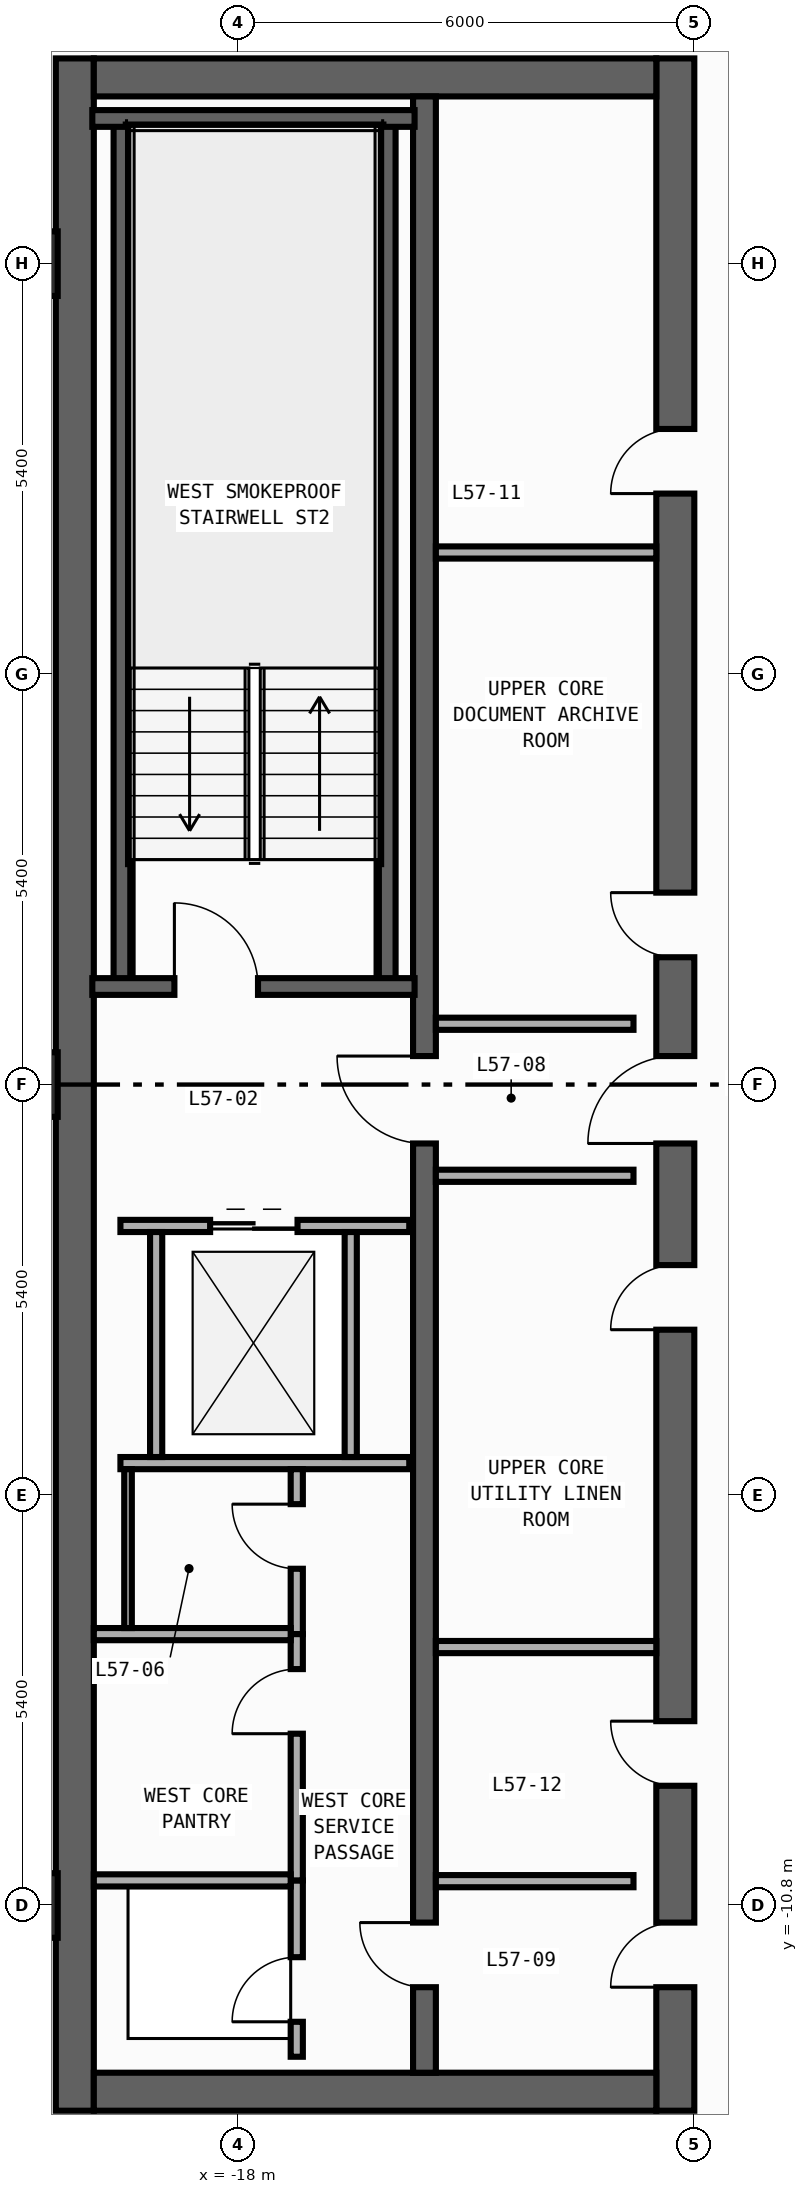
"""IFC4 building model, lengths in metres.
Left out: names, types, materials, properties, quantities, classifications, styles, units other than length and angle.
Written with IfcOpenShell. Run it as: python <this file> out.ifc"""

import sys

from ifc_helpers import new_model, si_unit, direction, frame, frame_2d, origin, origin_2d, place, context, subcontext, project, spatial, rectangle, extrude, element, fill, save


model = new_model("IFC4")
c1 = context("Model", 3, precision=1e-05, world=origin(), true_north=direction((0.0, 1.0)))
c2 = subcontext(c1, "Body", "Model", "MODEL_VIEW")
j1 = project(units=[si_unit("LENGTHUNIT", "METRE"), si_unit("PLANEANGLEUNIT", "RADIAN")], contexts=[c1])
p1 = place(None, origin())
s1 = spatial("IfcSite", under=j1, at=p1, CompositionType="ELEMENT")
p2 = place(p1, origin())
s2 = spatial("IfcBuilding", under=s1, at=p2, CompositionType="ELEMENT")
p3 = place(p2, frame((0.0, 0.0, 244.0)))
s3 = spatial("IfcBuildingStorey", under=s2, at=p3, CompositionType="ELEMENT", Elevation=244.0)
p4 = place(p3, frame((-20.15, -13.5, 0.0), z_axis=(0.0, 0.0, 1.0), x_axis=(0.0, 1.0, 0.0)))
e1 = element("IfcWall", 1, at=p4, inside=s3, PredefinedType="SHEAR", context=c2, shape_type="SweptSolid", body=[
    extrude(rectangle(XDim=27.0, YDim=0.5, at=frame_2d((13.5, 0.0))), origin(), (0.0, 0.0, 1.0), 3.34),
])
p5 = place(p3, frame((-12.25, -13.5, 0.0), z_axis=(0.0, 0.0, 1.0), x_axis=(0.0, 1.0, 0.0)))
e2 = element("IfcWall", 2, at=p5, inside=s3, PredefinedType="SHEAR", context=c2, shape_type="SweptSolid", body=[
    extrude(rectangle(XDim=27.0, YDim=0.5, at=frame_2d((13.5, 0.0))), origin(), (0.0, 0.0, 1.0), 3.34),
])
p6 = place(p5, frame((15.175, 0.0, 0.0)))
e3 = element("IfcOpeningElement", 3, at=p6, cuts=e2, PredefinedType="OPENING", context=c2, shape_type="SweptSolid", body=[
    extrude(rectangle(XDim=0.85, YDim=2.1, at=frame_2d((0.425, 1.05))), frame((0.0, 0.26, 0.0), z_axis=(0.0, -1.0, 0.0), x_axis=(1.0, 0.0, 0.0)), (0.0, 0.0, 1.0), 0.52),
])
p7 = place(p5, frame((21.275, 0.0, 0.0)))
e4 = element("IfcOpeningElement", 4, at=p7, cuts=e2, PredefinedType="OPENING", context=c2, shape_type="SweptSolid", body=[
    extrude(rectangle(XDim=0.85, YDim=2.1, at=frame_2d((0.425, 1.05))), frame((0.0, 0.26, 0.0), z_axis=(0.0, -1.0, 0.0), x_axis=(1.0, 0.0, 0.0)), (0.0, 0.0, 1.0), 0.52),
])
p8 = place(p5, frame((4.275, 0.0, 0.0)))
e5 = element("IfcOpeningElement", 5, at=p8, cuts=e2, PredefinedType="OPENING", context=c2, shape_type="SweptSolid", body=[
    extrude(rectangle(XDim=0.85, YDim=2.1, at=frame_2d((0.425, 1.05))), frame((0.0, 0.26, 0.0), z_axis=(0.0, -1.0, 0.0), x_axis=(1.0, 0.0, 0.0)), (0.0, 0.0, 1.0), 0.52),
])
p9 = place(p5, frame((10.275, 0.0, 0.0)))
e6 = element("IfcOpeningElement", 6, at=p9, cuts=e2, PredefinedType="OPENING", context=c2, shape_type="SweptSolid", body=[
    extrude(rectangle(XDim=0.85, YDim=2.1, at=frame_2d((0.425, 1.05))), frame((0.0, 0.26, 0.0), z_axis=(0.0, -1.0, 0.0), x_axis=(1.0, 0.0, 0.0)), (0.0, 0.0, 1.0), 0.52),
])
p10 = place(p5, frame((12.725, 0.0, 0.0)))
e7 = element("IfcOpeningElement", 7, at=p10, cuts=e2, PredefinedType="OPENING", context=c2, shape_type="SweptSolid", body=[
    extrude(rectangle(XDim=1.15, YDim=2.2, at=frame_2d((0.575, 1.1))), frame((0.0, 0.26, 0.0), z_axis=(0.0, -1.0, 0.0), x_axis=(1.0, 0.0, 0.0)), (0.0, 0.0, 1.0), 0.52),
])
p11 = place(p5, frame((1.625, 0.0, 0.0)))
e8 = element("IfcOpeningElement", 8, at=p11, cuts=e2, PredefinedType="OPENING", context=c2, shape_type="SweptSolid", body=[
    extrude(rectangle(XDim=0.85, YDim=2.1, at=frame_2d((0.425, 1.05))), frame((0.0, 0.26, 0.0), z_axis=(0.0, -1.0, 0.0), x_axis=(1.0, 0.0, 0.0)), (0.0, 0.0, 1.0), 0.52),
])
for number, where, z_axis, x_axis in (
    (9, (-19.9, -13.25, 0.0), (0.0, 0.0, 1.0), (1.0, 0.0, 0.0)),
    (10, (-19.9, 13.25, 0.0), (0.0, 0.0, 1.0), (1.0, 0.0, 0.0)),
):
    element("IfcWall", number, at=place(p3, frame(where, z_axis=z_axis, x_axis=x_axis)), inside=s3, PredefinedType="SHEAR", context=c2, shape_type="SweptSolid", body=[
        extrude(rectangle(XDim=7.4, YDim=0.5, at=frame_2d((3.7, 0.0))), origin(), (0.0, 0.0, 1.0), 3.34),
    ])
p12 = place(p3, frame((-15.55, -13.0, 0.0), z_axis=(0.0, 0.0, 1.0), x_axis=(0.0, 1.0, 0.0)))
e11 = element("IfcWall", 11, at=p12, inside=s3, PredefinedType="SHEAR", context=c2, shape_type="SweptSolid", body=[
    extrude(rectangle(XDim=26.0, YDim=0.3, at=frame_2d((13.0, 0.0))), origin(), (0.0, 0.0, 1.0), 3.34),
])
p13 = place(p12, frame((12.225, 0.0, 0.0)))
e12 = element("IfcOpeningElement", 12, at=p13, cuts=e11, PredefinedType="OPENING", context=c2, shape_type="SweptSolid", body=[
    extrude(rectangle(XDim=1.15, YDim=2.2, at=frame_2d((0.575, 1.1))), frame((0.0, 0.16, 0.0), z_axis=(0.0, -1.0, 0.0), x_axis=(1.0, 0.0, 0.0)), (0.0, 0.0, 1.0), 0.32),
])
p14 = place(p12, frame((1.125, 0.0, 0.0)))
e13 = element("IfcOpeningElement", 13, at=p14, cuts=e11, PredefinedType="OPENING", context=c2, shape_type="SweptSolid", body=[
    extrude(rectangle(XDim=0.85, YDim=2.1, at=frame_2d((0.425, 1.05))), frame((0.0, 0.16, 0.0), z_axis=(0.0, -1.0, 0.0), x_axis=(1.0, 0.0, 0.0)), (0.0, 0.0, 1.0), 0.32),
])
for number, where, z_axis, x_axis in (
    (14, (-16.04, 1.29, 0.0), (0.0, 0.0, 1.0), (0.0, 1.0, 0.0)),
    (15, (-19.53, 1.29, 0.0), (0.0, 0.0, 1.0), (0.0, 1.0, 0.0)),
):
    element("IfcWall", number, at=place(p3, frame(where, z_axis=z_axis, x_axis=x_axis)), inside=s3, PredefinedType="SHEAR", context=c2, shape_type="SweptSolid", body=[
        extrude(rectangle(XDim=11.42, YDim=0.22, at=frame_2d((5.71, 0.0))), origin(), (0.0, 0.0, 1.0), 3.34),
    ])
p15 = place(p3, frame((-19.92, 12.71, 0.0), z_axis=(0.0, 0.0, 1.0), x_axis=(1.0, 0.0, 0.0)))
e16 = element("IfcWall", 16, at=p15, inside=s3, PredefinedType="SHEAR", context=c2, shape_type="SweptSolid", body=[
    extrude(rectangle(XDim=4.24, YDim=0.22, at=frame_2d((2.12, 0.0))), origin(), (0.0, 0.0, 1.0), 3.34),
])
p16 = place(p3, frame((-19.92, 1.29, 0.0), z_axis=(0.0, 0.0, 1.0), x_axis=(1.0, 0.0, 0.0)))
e17 = element("IfcWall", 17, at=p16, inside=s3, PredefinedType="SHEAR", context=c2, shape_type="SweptSolid", body=[
    extrude(rectangle(XDim=4.24, YDim=0.22, at=frame_2d((2.12, 0.0))), origin(), (0.0, 0.0, 1.0), 3.34),
])
p17 = place(p16, frame((1.08, 0.0, 0.0)))
e18 = element("IfcOpeningElement", 18, at=p17, cuts=e17, PredefinedType="OPENING", context=c2, shape_type="SweptSolid", body=[
    extrude(rectangle(XDim=1.1, YDim=2.2, at=frame_2d((0.55, 1.1))), frame((0.0, 0.12, 0.0), z_axis=(0.0, -1.0, 0.0), x_axis=(1.0, 0.0, 0.0)), (0.0, 0.0, 1.0), 0.24),
])
for number, where, z_axis, x_axis in (
    (19, (-20.8, -10.8, 0.0), (0.0, 0.0, 1.0), (1.0, 0.0, 0.0)),
    (20, (-20.8, 0.0, 0.0), (0.0, 0.0, 1.0), (1.0, 0.0, 0.0)),
    (21, (-20.8, 10.8, 0.0), (0.0, 0.0, 1.0), (1.0, 0.0, 0.0)),
):
    element("IfcColumn", number, at=place(p3, frame(where, z_axis=z_axis, x_axis=x_axis)), inside=s3, PredefinedType="COLUMN", context=c2, shape_type="SweptSolid", body=[
        extrude(rectangle(XDim=0.85, YDim=0.85, at=origin_2d()), origin(), (0.0, 0.0, 1.0), 3.6),
    ])
p18 = place(p3, frame((-19.55, -1.86, 0.0), z_axis=(0.0, 0.0, 1.0), x_axis=(1.0, 0.0, 0.0)))
e22 = element("IfcWall", 22, at=p18, inside=s3, PredefinedType="STANDARD", context=c2, shape_type="SweptSolid", body=[
    extrude(rectangle(XDim=3.8, YDim=0.16, at=frame_2d((1.9, 0.0))), origin(), (0.0, 0.0, 1.0), 3.34),
])
p19 = place(p18, frame((1.18, 0.0, 0.0)))
e23 = element("IfcOpeningElement", 23, at=p19, cuts=e22, PredefinedType="OPENING", context=c2, shape_type="SweptSolid", body=[
    extrude(rectangle(XDim=1.15, YDim=2.2, at=frame_2d((0.575, 1.1))), frame((0.0, 0.09, 0.0), z_axis=(0.0, -1.0, 0.0), x_axis=(1.0, 0.0, 0.0)), (0.0, 0.0, 1.0), 0.18),
])
p20 = place(p3, frame((-19.55, -4.98, 0.0), z_axis=(0.0, 0.0, 1.0), x_axis=(1.0, 0.0, 0.0)))
e24 = element("IfcWall", 24, at=p20, inside=s3, PredefinedType="STANDARD", context=c2, shape_type="SweptSolid", body=[
    extrude(rectangle(XDim=3.8, YDim=0.16, at=frame_2d((1.9, 0.0))), origin(), (0.0, 0.0, 1.0), 3.34),
])
for number, where, z_axis, x_axis in (
    (25, (-19.08, -4.9, 0.0), (0.0, 0.0, 1.0), (0.0, 1.0, 0.0)),
    (26, (-16.52, -4.9, 0.0), (0.0, 0.0, 1.0), (0.0, 1.0, 0.0)),
):
    element("IfcWall", number, at=place(p3, frame(where, z_axis=z_axis, x_axis=x_axis)), inside=s3, PredefinedType="STANDARD", context=c2, shape_type="SweptSolid", body=[
        extrude(rectangle(XDim=2.96, YDim=0.16, at=frame_2d((1.48, 0.0))), origin(), (0.0, 0.0, 1.0), 3.34),
    ])
for number, where, z_axis, x_axis in (
    (27, (-15.4, 0.8, 0.0), (0.0, 0.0, 1.0), (1.0, 0.0, 0.0)),
    (28, (-15.4, -1.2, 0.0), (0.0, 0.0, 1.0), (1.0, 0.0, 0.0)),
    (29, (-15.4, -10.48, 0.0), (0.0, 0.0, 1.0), (1.0, 0.0, 0.0)),
):
    element("IfcWall", number, at=place(p3, frame(where, z_axis=z_axis, x_axis=x_axis)), inside=s3, PredefinedType="STANDARD", context=c2, shape_type="SweptSolid", body=[
        extrude(rectangle(XDim=2.6, YDim=0.16, at=frame_2d((1.3, 0.0))), origin(), (0.0, 0.0, 1.0), 3.34),
    ])
p21 = place(p3, frame((-17.23, -12.79, 0.0), z_axis=(0.0, 0.0, 1.0), x_axis=(0.0, 1.0, 0.0)))
e30 = element("IfcWall", 30, at=p21, inside=s3, PredefinedType="PARTITIONING", context=c2, shape_type="SweptSolid", body=[
    extrude(rectangle(XDim=2.32, YDim=0.16, at=frame_2d((1.16, 0.0))), origin(), (0.0, 0.0, 1.0), 3.34),
])
p22 = place(p21, frame((0.46, 0.0, 0.0)))
e31 = element("IfcOpeningElement", 31, at=p22, cuts=e30, PredefinedType="OPENING", context=c2, shape_type="SweptSolid", body=[
    extrude(rectangle(XDim=0.85, YDim=2.1, at=frame_2d((0.425, 1.05))), frame((0.0, 0.09, 0.0), z_axis=(0.0, -1.0, 0.0), x_axis=(1.0, 0.0, 0.0)), (0.0, 0.0, 1.0), 0.18),
])
p23 = place(p3, frame((-17.23, -7.23, 0.0), z_axis=(0.0, 0.0, 1.0), x_axis=(0.0, 1.0, 0.0)))
e32 = element("IfcWall", 32, at=p23, inside=s3, PredefinedType="PARTITIONING", context=c2, shape_type="SweptSolid", body=[
    extrude(rectangle(XDim=2.17, YDim=0.16, at=frame_2d((1.085, 0.0))), origin(), (0.0, 0.0, 1.0), 3.34),
])
p24 = place(p23, frame((0.86, 0.0, 0.0)))
e33 = element("IfcOpeningElement", 33, at=p24, cuts=e32, PredefinedType="OPENING", context=c2, shape_type="SweptSolid", body=[
    extrude(rectangle(XDim=0.85, YDim=2.1, at=frame_2d((0.425, 1.05))), frame((0.0, 0.09, 0.0), z_axis=(0.0, -1.0, 0.0), x_axis=(1.0, 0.0, 0.0)), (0.0, 0.0, 1.0), 0.18),
])
p25 = place(p3, frame((-17.23, -10.47, 0.0), z_axis=(0.0, 0.0, 1.0), x_axis=(0.0, 1.0, 0.0)))
e34 = element("IfcWall", 34, at=p25, inside=s3, PredefinedType="PARTITIONING", context=c2, shape_type="SweptSolid", body=[
    extrude(rectangle(XDim=3.24, YDim=0.16, at=frame_2d((1.62, 0.0))), origin(), (0.0, 0.0, 1.0), 3.34),
])
p26 = place(p25, frame((1.93, 0.0, 0.0)))
e35 = element("IfcOpeningElement", 35, at=p26, cuts=e34, PredefinedType="OPENING", context=c2, shape_type="SweptSolid", body=[
    extrude(rectangle(XDim=0.85, YDim=2.1, at=frame_2d((0.425, 1.05))), frame((0.0, 0.09, 0.0), z_axis=(0.0, -1.0, 0.0), x_axis=(1.0, 0.0, 0.0)), (0.0, 0.0, 1.0), 0.18),
])
for number, where, z_axis, x_axis in (
    (36, (-19.9, -10.47, 0.0), (0.0, 0.0, 1.0), (1.0, 0.0, 0.0)),
    (37, (-19.9, -7.23, 0.0), (0.0, 0.0, 1.0), (1.0, 0.0, 0.0)),
):
    element("IfcWall", number, at=place(p3, frame(where, z_axis=z_axis, x_axis=x_axis)), inside=s3, PredefinedType="PARTITIONING", context=c2, shape_type="SweptSolid", body=[
        extrude(rectangle(XDim=2.59, YDim=0.16, at=frame_2d((1.295, 0.0))), origin(), (0.0, 0.0, 1.0), 3.34),
    ])
for number, where, z_axis, x_axis in (
    (38, (-15.4, 7.0, 0.0), (0.0, 0.0, 1.0), (1.0, 0.0, 0.0)),
    (39, (-15.4, -7.4, 0.0), (0.0, 0.0, 1.0), (1.0, 0.0, 0.0)),
):
    element("IfcWall", number, at=place(p3, frame(where, z_axis=z_axis, x_axis=x_axis)), inside=s3, PredefinedType="PARTITIONING", context=c2, shape_type="SweptSolid", body=[
        extrude(rectangle(XDim=2.9, YDim=0.16, at=frame_2d((1.45, 0.0))), origin(), (0.0, 0.0, 1.0), 3.34),
    ])
p27 = place(p3, frame((-19.45, -7.15, 0.0), z_axis=(0.0, 0.0, 1.0), x_axis=(0.0, 1.0, 0.0)))
e40 = element("IfcWall", 40, at=p27, inside=s3, PredefinedType="PARTITIONING", context=c2, shape_type="SweptSolid", body=[
    extrude(rectangle(XDim=2.09, YDim=0.1, at=frame_2d((1.045, 0.0))), origin(), (0.0, 0.0, 1.0), 3.34),
])
p28 = place(p17, origin())
e41 = element("IfcDoor", 41, at=p28, inside=s3, OperationType="SINGLE_SWING_LEFT", PredefinedType="DOOR", context=c2, shape_type="SweptSolid", body=[
    extrude(rectangle(XDim=1.1, YDim=2.2, at=frame_2d((0.55, 1.1))), frame((0.0, 0.025, 0.0), z_axis=(0.0, -1.0, 0.0), x_axis=(1.0, 0.0, 0.0)), (0.0, 0.0, 1.0), 0.05),
])
fill(e18, e41)
p29 = place(p6, origin())
e42 = element("IfcDoor", 42, at=p29, inside=s3, OperationType="SINGLE_SWING_RIGHT", PredefinedType="DOOR", context=c2, shape_type="SweptSolid", body=[
    extrude(rectangle(XDim=0.85, YDim=2.1, at=frame_2d((0.425, 1.05))), frame((0.0, 0.025, 0.0), z_axis=(0.0, -1.0, 0.0), x_axis=(1.0, 0.0, 0.0)), (0.0, 0.0, 1.0), 0.05),
])
fill(e3, e42)
p30 = place(p7, origin())
e43 = element("IfcDoor", 43, at=p30, inside=s3, OperationType="SINGLE_SWING_LEFT", PredefinedType="DOOR", context=c2, shape_type="SweptSolid", body=[
    extrude(rectangle(XDim=0.85, YDim=2.1, at=frame_2d((0.425, 1.05))), frame((0.0, 0.025, 0.0), z_axis=(0.0, -1.0, 0.0), x_axis=(1.0, 0.0, 0.0)), (0.0, 0.0, 1.0), 0.05),
])
fill(e4, e43)
p31 = place(p8, origin())
e44 = element("IfcDoor", 44, at=p31, inside=s3, OperationType="SINGLE_SWING_RIGHT", PredefinedType="DOOR", context=c2, shape_type="SweptSolid", body=[
    extrude(rectangle(XDim=0.85, YDim=2.1, at=frame_2d((0.425, 1.05))), frame((0.0, 0.025, 0.0), z_axis=(0.0, -1.0, 0.0), x_axis=(1.0, 0.0, 0.0)), (0.0, 0.0, 1.0), 0.05),
])
fill(e5, e44)
p32 = place(p9, origin())
e45 = element("IfcDoor", 45, at=p32, inside=s3, OperationType="SINGLE_SWING_LEFT", PredefinedType="DOOR", context=c2, shape_type="SweptSolid", body=[
    extrude(rectangle(XDim=0.85, YDim=2.1, at=frame_2d((0.425, 1.05))), frame((0.0, 0.025, 0.0), z_axis=(0.0, -1.0, 0.0), x_axis=(1.0, 0.0, 0.0)), (0.0, 0.0, 1.0), 0.05),
])
fill(e6, e45)
p33 = place(p10, origin())
e46 = element("IfcDoor", 46, at=p33, inside=s3, OperationType="SINGLE_SWING_LEFT", PredefinedType="DOOR", context=c2, shape_type="SweptSolid", body=[
    extrude(rectangle(XDim=1.15, YDim=2.2, at=frame_2d((0.575, 1.1))), frame((0.0, 0.025, 0.0), z_axis=(0.0, -1.0, 0.0), x_axis=(1.0, 0.0, 0.0)), (0.0, 0.0, 1.0), 0.05),
])
fill(e7, e46)
p34 = place(p13, origin())
e47 = element("IfcDoor", 47, at=p34, inside=s3, OperationType="SINGLE_SWING_RIGHT", PredefinedType="DOOR", context=c2, shape_type="SweptSolid", body=[
    extrude(rectangle(XDim=1.15, YDim=2.2, at=frame_2d((0.575, 1.1))), frame((0.0, 0.025, 0.0), z_axis=(0.0, -1.0, 0.0), x_axis=(1.0, 0.0, 0.0)), (0.0, 0.0, 1.0), 0.05),
])
fill(e12, e47)
p35 = place(p11, origin())
e48 = element("IfcDoor", 48, at=p35, inside=s3, OperationType="SINGLE_SWING_LEFT", PredefinedType="DOOR", context=c2, shape_type="SweptSolid", body=[
    extrude(rectangle(XDim=0.85, YDim=2.1, at=frame_2d((0.425, 1.05))), frame((0.0, 0.025, 0.0), z_axis=(0.0, -1.0, 0.0), x_axis=(1.0, 0.0, 0.0)), (0.0, 0.0, 1.0), 0.05),
])
fill(e8, e48)
p36 = place(p14, origin())
e49 = element("IfcDoor", 49, at=p36, inside=s3, OperationType="SINGLE_SWING_RIGHT", PredefinedType="DOOR", context=c2, shape_type="SweptSolid", body=[
    extrude(rectangle(XDim=0.85, YDim=2.1, at=frame_2d((0.425, 1.05))), frame((0.0, 0.025, 0.0), z_axis=(0.0, -1.0, 0.0), x_axis=(1.0, 0.0, 0.0)), (0.0, 0.0, 1.0), 0.05),
])
fill(e13, e49)
p37 = place(p19, origin())
e50 = element("IfcDoor", 50, at=p37, inside=s3, OperationType="DOUBLE_DOOR_SLIDING", PredefinedType="DOOR", context=c2, shape_type="SweptSolid", body=[
    extrude(rectangle(XDim=1.15, YDim=2.2, at=frame_2d((0.575, 1.1))), frame((0.0, 0.025, 0.0), z_axis=(0.0, -1.0, 0.0), x_axis=(1.0, 0.0, 0.0)), (0.0, 0.0, 1.0), 0.05),
])
fill(e23, e50)
p38 = place(p22, origin())
e51 = element("IfcDoor", 51, at=p38, inside=s3, OperationType="SINGLE_SWING_LEFT", PredefinedType="DOOR", context=c2, shape_type="SweptSolid", body=[
    extrude(rectangle(XDim=0.85, YDim=2.1, at=frame_2d((0.425, 1.05))), frame((0.0, 0.025, 0.0), z_axis=(0.0, -1.0, 0.0), x_axis=(1.0, 0.0, 0.0)), (0.0, 0.0, 1.0), 0.05),
])
fill(e31, e51)
p39 = place(p24, origin())
e52 = element("IfcDoor", 52, at=p39, inside=s3, OperationType="SINGLE_SWING_RIGHT", PredefinedType="DOOR", context=c2, shape_type="SweptSolid", body=[
    extrude(rectangle(XDim=0.85, YDim=2.1, at=frame_2d((0.425, 1.05))), frame((0.0, 0.025, 0.0), z_axis=(0.0, -1.0, 0.0), x_axis=(1.0, 0.0, 0.0)), (0.0, 0.0, 1.0), 0.05),
])
fill(e33, e52)
p40 = place(p26, origin())
e53 = element("IfcDoor", 53, at=p40, inside=s3, OperationType="SINGLE_SWING_LEFT", PredefinedType="DOOR", context=c2, shape_type="SweptSolid", body=[
    extrude(rectangle(XDim=0.85, YDim=2.1, at=frame_2d((0.425, 1.05))), frame((0.0, 0.025, 0.0), z_axis=(0.0, -1.0, 0.0), x_axis=(1.0, 0.0, 0.0)), (0.0, 0.0, 1.0), 0.05),
])
fill(e35, e53)
save(model, sys.argv[1])
